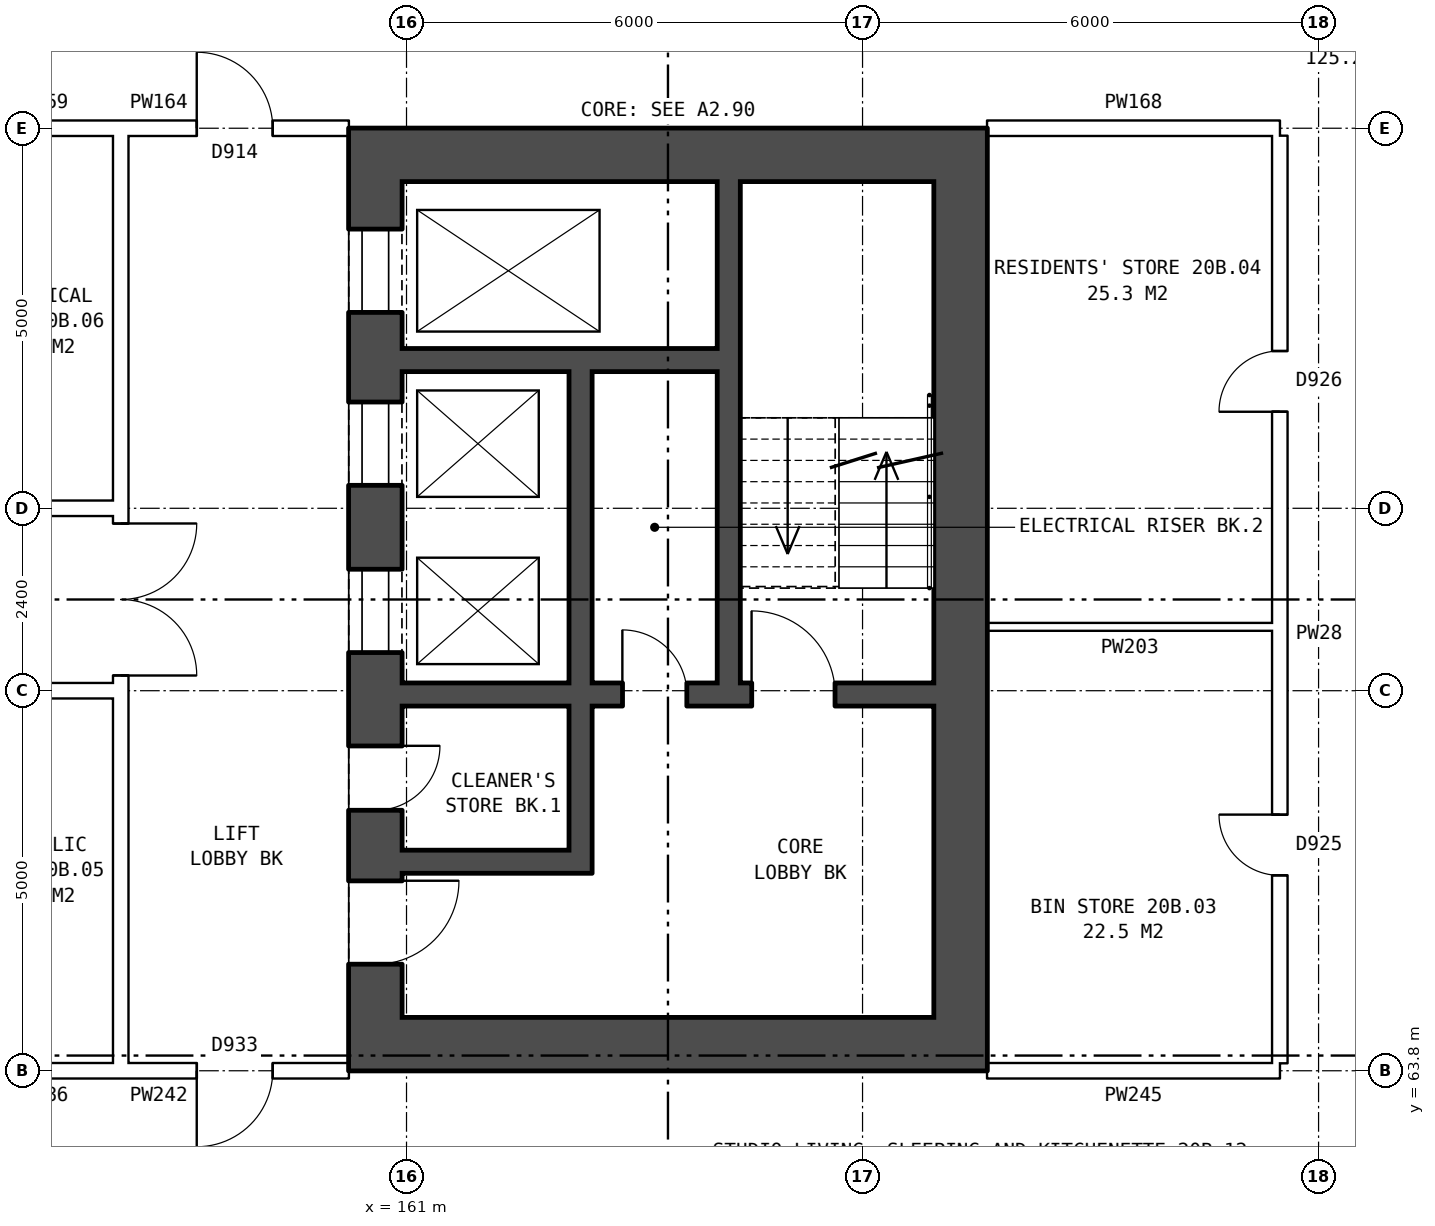
"""IFC4 building model, lengths in metres.
Left out: names, types, materials, properties, quantities, classifications, styles, units other than length and angle.
Written with IfcOpenShell. Run it as: python <this file> out.ifc"""

import sys

from ifc_helpers import new_model, si_unit, direction, frame, frame_2d, origin, place, context, subcontext, project, spatial, rectangle, extrude, element, fill, save


model = new_model("IFC4")
c1 = context("Model", 3, precision=1e-05, world=origin(), true_north=direction((0.0, 1.0)))
c2 = subcontext(c1, "Body", "Model", "MODEL_VIEW")
j1 = project(units=[si_unit("LENGTHUNIT", "METRE"), si_unit("PLANEANGLEUNIT", "RADIAN")], contexts=[c1])
p1 = place(None, origin())
s1 = spatial("IfcSite", under=j1, at=p1, CompositionType="ELEMENT")
p2 = place(p1, origin())
s2 = spatial("IfcBuilding", under=s1, at=p2, CompositionType="ELEMENT")
p3 = place(p2, frame((0.0, 0.0, 74.7)))
s3 = spatial("IfcBuildingStorey", under=s2, at=p3, CompositionType="ELEMENT", Elevation=74.7)
p4 = place(p3, frame((160.59, 75.5, 0.0), z_axis=(0.0, 0.0, 1.0), x_axis=(0.0, -1.0, 0.0)))
e1 = element("IfcWall", 1, at=p4, inside=s3, PredefinedType="SHEAR", context=c2, shape_type="SweptSolid", body=[
    extrude(rectangle(XDim=11.0, YDim=0.7, at=frame_2d((5.5, 0.0))), origin(), (0.0, 0.0, 1.0), 2.85),
])
p5 = place(p4, frame((0.625, 0.0, 0.0)))
e2 = element("IfcOpeningElement", 2, at=p5, cuts=e1, PredefinedType="OPENING", context=c2, shape_type="SweptSolid", body=[
    extrude(rectangle(XDim=1.1, YDim=2.1, at=frame_2d((0.55, 1.05))), frame((0.0, 0.36, 0.0), z_axis=(0.0, -1.0, 0.0), x_axis=(1.0, 0.0, 0.0)), (0.0, 0.0, 1.0), 0.72),
])
p6 = place(p4, frame((2.9, 0.0, 0.0)))
e3 = element("IfcOpeningElement", 3, at=p6, cuts=e1, PredefinedType="OPENING", context=c2, shape_type="SweptSolid", body=[
    extrude(rectangle(XDim=1.1, YDim=2.1, at=frame_2d((0.55, 1.05))), frame((0.0, 0.36, 0.0), z_axis=(0.0, -1.0, 0.0), x_axis=(1.0, 0.0, 0.0)), (0.0, 0.0, 1.0), 0.72),
])
p7 = place(p4, frame((5.1, 0.0, 0.0)))
e4 = element("IfcOpeningElement", 4, at=p7, cuts=e1, PredefinedType="OPENING", context=c2, shape_type="SweptSolid", body=[
    extrude(rectangle(XDim=1.1, YDim=2.1, at=frame_2d((0.55, 1.05))), frame((0.0, 0.36, 0.0), z_axis=(0.0, -1.0, 0.0), x_axis=(1.0, 0.0, 0.0)), (0.0, 0.0, 1.0), 0.72),
])
p8 = place(p4, frame((9.2, 0.0, 0.0)))
e5 = element("IfcOpeningElement", 5, at=p8, cuts=e1, PredefinedType="OPENING", context=c2, shape_type="SweptSolid", body=[
    extrude(rectangle(XDim=1.1, YDim=2.1, at=frame_2d((0.55, 1.05))), frame((0.0, 0.36, 0.0), z_axis=(0.0, -1.0, 0.0), x_axis=(1.0, 0.0, 0.0)), (0.0, 0.0, 1.0), 0.72),
])
p9 = place(p4, frame((7.425, 0.0, 0.0)))
e6 = element("IfcOpeningElement", 6, at=p9, cuts=e1, PredefinedType="OPENING", context=c2, shape_type="SweptSolid", body=[
    extrude(rectangle(XDim=0.85, YDim=2.1, at=frame_2d((0.425, 1.05))), frame((0.0, 0.36, 0.0), z_axis=(0.0, -1.0, 0.0), x_axis=(1.0, 0.0, 0.0)), (0.0, 0.0, 1.0), 0.72),
])
p10 = place(p3, frame((168.29, 75.5, 0.0), z_axis=(0.0, 0.0, 1.0), x_axis=(0.0, -1.0, 0.0)))
e7 = element("IfcWall", 7, at=p10, inside=s3, PredefinedType="SHEAR", context=c2, shape_type="SweptSolid", body=[
    extrude(rectangle(XDim=11.0, YDim=0.7, at=frame_2d((5.5, 0.0))), origin(), (0.0, 0.0, 1.0), 2.85),
])
for number, where, z_axis, x_axis in (
    (8, (160.24, 75.85, 0.0), (0.0, 0.0, 1.0), (1.0, 0.0, 0.0)),
    (9, (160.24, 64.15, 0.0), (0.0, 0.0, 1.0), (1.0, 0.0, 0.0)),
):
    element("IfcWall", number, at=place(p3, frame(where, z_axis=z_axis, x_axis=x_axis)), inside=s3, PredefinedType="SHEAR", context=c2, shape_type="SweptSolid", body=[
        extrude(rectangle(XDim=8.4, YDim=0.7, at=frame_2d((4.2, 0.0))), origin(), (0.0, 0.0, 1.0), 2.85),
    ])
p11 = place(p3, frame((160.94, 73.15, 0.0), z_axis=(0.0, 0.0, 1.0), x_axis=(1.0, 0.0, 0.0)))
e10 = element("IfcWall", 10, at=p11, inside=s3, PredefinedType="SHEAR", context=c2, shape_type="SweptSolid", body=[
    extrude(rectangle(XDim=4.15, YDim=0.3, at=frame_2d((2.075, 0.0))), origin(), (0.0, 0.0, 1.0), 2.85),
])
p12 = place(p3, frame((160.94, 68.75, 0.0), z_axis=(0.0, 0.0, 1.0), x_axis=(1.0, 0.0, 0.0)))
e11 = element("IfcWall", 11, at=p12, inside=s3, PredefinedType="SHEAR", context=c2, shape_type="SweptSolid", body=[
    extrude(rectangle(XDim=7.0, YDim=0.3, at=frame_2d((3.5, 0.0))), origin(), (0.0, 0.0, 1.0), 2.85),
])
p13 = place(p12, frame((4.6, 0.0, 0.0)))
e12 = element("IfcOpeningElement", 12, at=p13, cuts=e11, PredefinedType="OPENING", context=c2, shape_type="SweptSolid", body=[
    extrude(rectangle(XDim=1.1, YDim=2.1, at=frame_2d((0.55, 1.05))), frame((0.0, 0.16, 0.0), z_axis=(0.0, -1.0, 0.0), x_axis=(1.0, 0.0, 0.0)), (0.0, 0.0, 1.0), 0.32),
])
p14 = place(p12, frame((2.9, 0.0, 0.0)))
e13 = element("IfcOpeningElement", 13, at=p14, cuts=e11, PredefinedType="OPENING", context=c2, shape_type="SweptSolid", body=[
    extrude(rectangle(XDim=0.85, YDim=2.1, at=frame_2d((0.425, 1.05))), frame((0.0, 0.16, 0.0), z_axis=(0.0, -1.0, 0.0), x_axis=(1.0, 0.0, 0.0)), (0.0, 0.0, 1.0), 0.32),
])
p15 = place(p3, frame((160.94, 66.55, 0.0), z_axis=(0.0, 0.0, 1.0), x_axis=(1.0, 0.0, 0.0)))
e14 = element("IfcWall", 14, at=p15, inside=s3, PredefinedType="SHEAR", context=c2, shape_type="SweptSolid", body=[
    extrude(rectangle(XDim=2.2, YDim=0.3, at=frame_2d((1.1, 0.0))), origin(), (0.0, 0.0, 1.0), 2.85),
])
p16 = place(p3, frame((163.29, 73.0, 0.0), z_axis=(0.0, 0.0, 1.0), x_axis=(0.0, -1.0, 0.0)))
e15 = element("IfcWall", 15, at=p16, inside=s3, PredefinedType="SHEAR", context=c2, shape_type="SweptSolid", body=[
    extrude(rectangle(XDim=4.1, YDim=0.3, at=frame_2d((2.05, 0.0))), origin(), (0.0, 0.0, 1.0), 2.85),
])
p17 = place(p3, frame((163.29, 68.6, 0.0), z_axis=(0.0, 0.0, 1.0), x_axis=(0.0, -1.0, 0.0)))
e16 = element("IfcWall", 16, at=p17, inside=s3, PredefinedType="SHEAR", context=c2, shape_type="SweptSolid", body=[
    extrude(rectangle(XDim=2.2, YDim=0.3, at=frame_2d((1.1, 0.0))), origin(), (0.0, 0.0, 1.0), 2.85),
])
p18 = place(p3, frame((165.24, 75.5, 0.0), z_axis=(0.0, 0.0, 1.0), x_axis=(0.0, -1.0, 0.0)))
e17 = element("IfcWall", 17, at=p18, inside=s3, PredefinedType="SHEAR", context=c2, shape_type="SweptSolid", body=[
    extrude(rectangle(XDim=6.6, YDim=0.3, at=frame_2d((3.3, 0.0))), origin(), (0.0, 0.0, 1.0), 2.85),
])
p19 = place(p3, frame((157.24, 63.9, 0.0), z_axis=(0.0, 0.0, 1.0), x_axis=(0.0, 1.0, 0.0)))
e18 = element("IfcWall", 18, at=p19, inside=s3, PredefinedType="PARTITIONING", context=c2, shape_type="SweptSolid", body=[
    extrude(rectangle(XDim=12.2, YDim=0.2, at=frame_2d((6.1, 0.0))), origin(), (0.0, 0.0, 1.0), 2.85),
])
p20 = place(p19, frame((5.1, 0.0, 0.0)))
e19 = element("IfcOpeningElement", 19, at=p20, cuts=e18, PredefinedType="OPENING", context=c2, shape_type="SweptSolid", body=[
    extrude(rectangle(XDim=2.0, YDim=2.1, at=frame_2d((1.0, 1.05))), frame((0.0, 0.11, 0.0), z_axis=(0.0, -1.0, 0.0), x_axis=(1.0, 0.0, 0.0)), (0.0, 0.0, 1.0), 0.22),
])
p21 = place(p3, frame((155.1, 63.8, 0.0), z_axis=(0.0, 0.0, 1.0), x_axis=(1.0, 0.0, 0.0)))
e20 = element("IfcWall", 20, at=p21, inside=s3, PredefinedType="PARTITIONING", context=c2, shape_type="SweptSolid", body=[
    extrude(rectangle(XDim=2.14, YDim=0.2, at=frame_2d((1.07, 0.0))), origin(), (0.0, 0.0, 1.0), 2.85),
])
p22 = place(p3, frame((157.24, 63.8, 0.0), z_axis=(0.0, 0.0, 1.0), x_axis=(1.0, 0.0, 0.0)))
e21 = element("IfcWall", 21, at=p22, inside=s3, PredefinedType="PARTITIONING", context=c2, shape_type="SweptSolid", body=[
    extrude(rectangle(XDim=3.0, YDim=0.2, at=frame_2d((1.5, 0.0))), origin(), (0.0, 0.0, 1.0), 2.85),
])
p23 = place(p22, frame((1.0, 0.0, 0.0)))
e22 = element("IfcOpeningElement", 22, at=p23, cuts=e21, PredefinedType="OPENING", context=c2, shape_type="SweptSolid", body=[
    extrude(rectangle(XDim=1.0, YDim=2.1, at=frame_2d((0.5, 1.05))), frame((0.0, 0.11, 0.0), z_axis=(0.0, -1.0, 0.0), x_axis=(1.0, 0.0, 0.0)), (0.0, 0.0, 1.0), 0.22),
])
p24 = place(p3, frame((168.64, 63.8, 0.0), z_axis=(0.0, 0.0, 1.0), x_axis=(1.0, 0.0, 0.0)))
e23 = element("IfcWall", 23, at=p24, inside=s3, PredefinedType="PARTITIONING", context=c2, shape_type="SweptSolid", body=[
    extrude(rectangle(XDim=3.85, YDim=0.2, at=frame_2d((1.925, 0.0))), origin(), (0.0, 0.0, 1.0), 2.85),
])
p25 = place(p3, frame((142.76, 68.8, 0.0), z_axis=(0.0, 0.0, 1.0), x_axis=(1.0, 0.0, 0.0)))
e24 = element("IfcWall", 24, at=p25, inside=s3, PredefinedType="PARTITIONING", context=c2, shape_type="SweptSolid", body=[
    extrude(rectangle(XDim=14.48, YDim=0.2, at=frame_2d((7.24, 0.0))), origin(), (0.0, 0.0, 1.0), 2.85),
])
p26 = place(p25, frame((4.24, 0.0, 0.0)))
e25 = element("IfcOpeningElement", 25, at=p26, cuts=e24, PredefinedType="OPENING", context=c2, shape_type="SweptSolid", body=[
    extrude(rectangle(XDim=1.0, YDim=2.1, at=frame_2d((0.5, 1.05))), frame((0.0, 0.11, 0.0), z_axis=(0.0, -1.0, 0.0), x_axis=(1.0, 0.0, 0.0)), (0.0, 0.0, 1.0), 0.22),
])
p27 = place(p25, frame((10.24, 0.0, 0.0)))
e26 = element("IfcOpeningElement", 26, at=p27, cuts=e24, PredefinedType="OPENING", context=c2, shape_type="SweptSolid", body=[
    extrude(rectangle(XDim=1.0, YDim=2.1, at=frame_2d((0.5, 1.05))), frame((0.0, 0.11, 0.0), z_axis=(0.0, -1.0, 0.0), x_axis=(1.0, 0.0, 0.0)), (0.0, 0.0, 1.0), 0.22),
])
p28 = place(p3, frame((168.64, 69.64, 0.0), z_axis=(0.0, 0.0, 1.0), x_axis=(1.0, 0.0, 0.0)))
e27 = element("IfcWall", 27, at=p28, inside=s3, PredefinedType="PARTITIONING", context=c2, shape_type="SweptSolid", body=[
    extrude(rectangle(XDim=3.75, YDim=0.1, at=frame_2d((1.875, 0.0))), origin(), (0.0, 0.0, 1.0), 2.85),
])
p29 = place(p3, frame((142.76, 71.2, 0.0), z_axis=(0.0, 0.0, 1.0), x_axis=(1.0, 0.0, 0.0)))
e28 = element("IfcWall", 28, at=p29, inside=s3, PredefinedType="PARTITIONING", context=c2, shape_type="SweptSolid", body=[
    extrude(rectangle(XDim=14.48, YDim=0.2, at=frame_2d((7.24, 0.0))), origin(), (0.0, 0.0, 1.0), 2.85),
])
p30 = place(p29, frame((4.24, 0.0, 0.0)))
e29 = element("IfcOpeningElement", 29, at=p30, cuts=e28, PredefinedType="OPENING", context=c2, shape_type="SweptSolid", body=[
    extrude(rectangle(XDim=1.0, YDim=2.1, at=frame_2d((0.5, 1.05))), frame((0.0, 0.11, 0.0), z_axis=(0.0, -1.0, 0.0), x_axis=(1.0, 0.0, 0.0)), (0.0, 0.0, 1.0), 0.22),
])
p31 = place(p29, frame((7.24, 0.0, 0.0)))
e30 = element("IfcOpeningElement", 30, at=p31, cuts=e28, PredefinedType="OPENING", context=c2, shape_type="SweptSolid", body=[
    extrude(rectangle(XDim=1.0, YDim=2.1, at=frame_2d((0.5, 1.05))), frame((0.0, 0.11, 0.0), z_axis=(0.0, -1.0, 0.0), x_axis=(1.0, 0.0, 0.0)), (0.0, 0.0, 1.0), 0.22),
])
p32 = place(p3, frame((155.1, 76.2, 0.0), z_axis=(0.0, 0.0, 1.0), x_axis=(1.0, 0.0, 0.0)))
e31 = element("IfcWall", 31, at=p32, inside=s3, PredefinedType="PARTITIONING", context=c2, shape_type="SweptSolid", body=[
    extrude(rectangle(XDim=2.14, YDim=0.2, at=frame_2d((1.07, 0.0))), origin(), (0.0, 0.0, 1.0), 2.85),
])
p33 = place(p3, frame((157.24, 76.2, 0.0), z_axis=(0.0, 0.0, 1.0), x_axis=(1.0, 0.0, 0.0)))
e32 = element("IfcWall", 32, at=p33, inside=s3, PredefinedType="PARTITIONING", context=c2, shape_type="SweptSolid", body=[
    extrude(rectangle(XDim=3.0, YDim=0.2, at=frame_2d((1.5, 0.0))), origin(), (0.0, 0.0, 1.0), 2.85),
])
p34 = place(p33, frame((1.0, 0.0, 0.0)))
e33 = element("IfcOpeningElement", 33, at=p34, cuts=e32, PredefinedType="OPENING", context=c2, shape_type="SweptSolid", body=[
    extrude(rectangle(XDim=1.0, YDim=2.1, at=frame_2d((0.5, 1.05))), frame((0.0, 0.11, 0.0), z_axis=(0.0, -1.0, 0.0), x_axis=(1.0, 0.0, 0.0)), (0.0, 0.0, 1.0), 0.22),
])
p35 = place(p3, frame((168.64, 76.2, 0.0), z_axis=(0.0, 0.0, 1.0), x_axis=(1.0, 0.0, 0.0)))
e34 = element("IfcWall", 34, at=p35, inside=s3, PredefinedType="PARTITIONING", context=c2, shape_type="SweptSolid", body=[
    extrude(rectangle(XDim=3.85, YDim=0.2, at=frame_2d((1.925, 0.0))), origin(), (0.0, 0.0, 1.0), 2.85),
])
p36 = place(p3, frame((172.49, 63.9, 0.0), z_axis=(0.0, 0.0, 1.0), x_axis=(0.0, 1.0, 0.0)))
e35 = element("IfcWall", 35, at=p36, inside=s3, PredefinedType="PARTITIONING", context=c2, shape_type="SweptSolid", body=[
    extrude(rectangle(XDim=12.2, YDim=0.2, at=frame_2d((6.1, 0.0))), origin(), (0.0, 0.0, 1.0), 2.85),
])
p37 = place(p36, frame((2.47, 0.0, 0.0)))
e36 = element("IfcOpeningElement", 36, at=p37, cuts=e35, PredefinedType="OPENING", context=c2, shape_type="SweptSolid", body=[
    extrude(rectangle(XDim=0.8, YDim=2.1, at=frame_2d((0.4, 1.05))), frame((0.0, 0.11, 0.0), z_axis=(0.0, -1.0, 0.0), x_axis=(1.0, 0.0, 0.0)), (0.0, 0.0, 1.0), 0.22),
])
p38 = place(p36, frame((8.57, 0.0, 0.0)))
e37 = element("IfcOpeningElement", 37, at=p38, cuts=e35, PredefinedType="OPENING", context=c2, shape_type="SweptSolid", body=[
    extrude(rectangle(XDim=0.8, YDim=2.1, at=frame_2d((0.4, 1.05))), frame((0.0, 0.11, 0.0), z_axis=(0.0, -1.0, 0.0), x_axis=(1.0, 0.0, 0.0)), (0.0, 0.0, 1.0), 0.22),
])
p39 = place(p5, origin())
e38 = element("IfcDoor", 38, at=p39, inside=s3, OperationType="DOUBLE_DOOR_SLIDING", PredefinedType="DOOR", context=c2, shape_type="SweptSolid", body=[
    extrude(rectangle(XDim=1.1, YDim=2.1, at=frame_2d((0.55, 1.05))), frame((0.0, 0.335, 0.0), z_axis=(0.0, -1.0, 0.0), x_axis=(1.0, 0.0, 0.0)), (0.0, 0.0, 1.0), 0.05),
])
fill(e2, e38)
p40 = place(p6, origin())
e39 = element("IfcDoor", 39, at=p40, inside=s3, OperationType="DOUBLE_DOOR_SLIDING", PredefinedType="DOOR", context=c2, shape_type="SweptSolid", body=[
    extrude(rectangle(XDim=1.1, YDim=2.1, at=frame_2d((0.55, 1.05))), frame((0.0, 0.335, 0.0), z_axis=(0.0, -1.0, 0.0), x_axis=(1.0, 0.0, 0.0)), (0.0, 0.0, 1.0), 0.05),
])
fill(e3, e39)
p41 = place(p7, origin())
e40 = element("IfcDoor", 40, at=p41, inside=s3, OperationType="DOUBLE_DOOR_SLIDING", PredefinedType="DOOR", context=c2, shape_type="SweptSolid", body=[
    extrude(rectangle(XDim=1.1, YDim=2.1, at=frame_2d((0.55, 1.05))), frame((0.0, 0.335, 0.0), z_axis=(0.0, -1.0, 0.0), x_axis=(1.0, 0.0, 0.0)), (0.0, 0.0, 1.0), 0.05),
])
fill(e4, e40)
p42 = place(p8, origin())
e41 = element("IfcDoor", 41, at=p42, inside=s3, OperationType="SINGLE_SWING_LEFT", PredefinedType="DOOR", context=c2, shape_type="SweptSolid", body=[
    extrude(rectangle(XDim=1.1, YDim=2.1, at=frame_2d((0.55, 1.05))), frame((0.0, 0.335, 0.0), z_axis=(0.0, -1.0, 0.0), x_axis=(1.0, 0.0, 0.0)), (0.0, 0.0, 1.0), 0.05),
])
fill(e5, e41)
p43 = place(p13, origin())
e42 = element("IfcDoor", 42, at=p43, inside=s3, OperationType="SINGLE_SWING_LEFT", PredefinedType="DOOR", context=c2, shape_type="SweptSolid", body=[
    extrude(rectangle(XDim=1.1, YDim=2.1, at=frame_2d((0.55, 1.05))), frame((0.0, 0.025, 0.0), z_axis=(0.0, -1.0, 0.0), x_axis=(1.0, 0.0, 0.0)), (0.0, 0.0, 1.0), 0.05),
])
fill(e12, e42)
p44 = place(p9, origin())
e43 = element("IfcDoor", 43, at=p44, inside=s3, OperationType="SINGLE_SWING_LEFT", PredefinedType="DOOR", context=c2, shape_type="SweptSolid", body=[
    extrude(rectangle(XDim=0.85, YDim=2.1, at=frame_2d((0.425, 1.05))), frame((0.0, 0.335, 0.0), z_axis=(0.0, -1.0, 0.0), x_axis=(1.0, 0.0, 0.0)), (0.0, 0.0, 1.0), 0.05),
])
fill(e6, e43)
p45 = place(p14, origin())
e44 = element("IfcDoor", 44, at=p45, inside=s3, OperationType="SINGLE_SWING_LEFT", PredefinedType="DOOR", context=c2, shape_type="SweptSolid", body=[
    extrude(rectangle(XDim=0.85, YDim=2.1, at=frame_2d((0.425, 1.05))), frame((0.0, 0.025, 0.0), z_axis=(0.0, -1.0, 0.0), x_axis=(1.0, 0.0, 0.0)), (0.0, 0.0, 1.0), 0.05),
])
fill(e13, e44)
p46 = place(p20, frame((2.0, 0.0, 0.0), z_axis=(0.0, 0.0, 1.0), x_axis=(-1.0, 0.0, 0.0)))
e45 = element("IfcDoor", 45, at=p46, inside=s3, OperationType="DOUBLE_DOOR_SINGLE_SWING", PredefinedType="DOOR", context=c2, shape_type="SweptSolid", body=[
    extrude(rectangle(XDim=2.0, YDim=2.1, at=frame_2d((1.0, 1.05))), frame((0.0, 0.025, 0.0), z_axis=(0.0, -1.0, 0.0), x_axis=(1.0, 0.0, 0.0)), (0.0, 0.0, 1.0), 0.05),
])
fill(e19, e45)
p47 = place(p23, frame((1.0, 0.0, 0.0), z_axis=(0.0, 0.0, 1.0), x_axis=(-1.0, 0.0, 0.0)))
e46 = element("IfcDoor", 46, at=p47, inside=s3, OperationType="SINGLE_SWING_RIGHT", PredefinedType="DOOR", context=c2, shape_type="SweptSolid", body=[
    extrude(rectangle(XDim=1.0, YDim=2.1, at=frame_2d((0.5, 1.05))), frame((0.0, 0.025, 0.0), z_axis=(0.0, -1.0, 0.0), x_axis=(1.0, 0.0, 0.0)), (0.0, 0.0, 1.0), 0.05),
])
fill(e22, e46)
p48 = place(p34, origin())
e47 = element("IfcDoor", 47, at=p48, inside=s3, OperationType="SINGLE_SWING_LEFT", PredefinedType="DOOR", context=c2, shape_type="SweptSolid", body=[
    extrude(rectangle(XDim=1.0, YDim=2.1, at=frame_2d((0.5, 1.05))), frame((0.0, 0.025, 0.0), z_axis=(0.0, -1.0, 0.0), x_axis=(1.0, 0.0, 0.0)), (0.0, 0.0, 1.0), 0.05),
])
fill(e33, e47)
p49 = place(p37, origin())
e48 = element("IfcDoor", 48, at=p49, inside=s3, OperationType="SINGLE_SWING_RIGHT", PredefinedType="DOOR", context=c2, shape_type="SweptSolid", body=[
    extrude(rectangle(XDim=0.8, YDim=2.1, at=frame_2d((0.4, 1.05))), frame((0.0, 0.025, 0.0), z_axis=(0.0, -1.0, 0.0), x_axis=(1.0, 0.0, 0.0)), (0.0, 0.0, 1.0), 0.05),
])
fill(e36, e48)
p50 = place(p38, origin())
e49 = element("IfcDoor", 49, at=p50, inside=s3, OperationType="SINGLE_SWING_LEFT", PredefinedType="DOOR", context=c2, shape_type="SweptSolid", body=[
    extrude(rectangle(XDim=0.8, YDim=2.1, at=frame_2d((0.4, 1.05))), frame((0.0, 0.025, 0.0), z_axis=(0.0, -1.0, 0.0), x_axis=(1.0, 0.0, 0.0)), (0.0, 0.0, 1.0), 0.05),
])
fill(e37, e49)
save(model, sys.argv[1])
